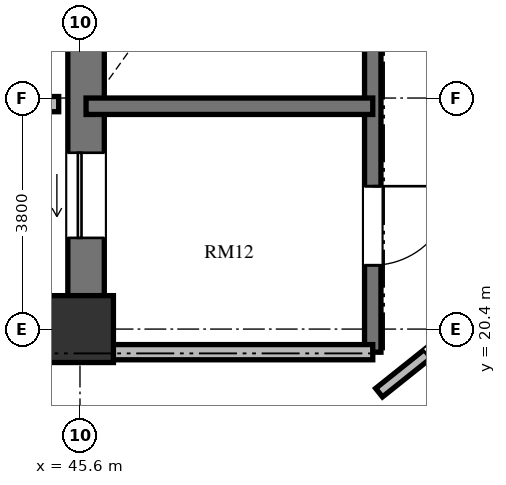
"""IFC4 building model, lengths in metres.
Left out: names, types, materials, properties, quantities, classifications, styles, units other than length and angle.
Written with IfcOpenShell. Run it as: python <this file> out.ifc"""

import sys

from ifc_helpers import new_model, si_unit, direction, frame, frame_2d, origin, origin_2d, place, context, subcontext, project, spatial, rectangle, extrude, element, fill, save


model = new_model("IFC4")
c1 = context("Model", 3, precision=1e-05, world=origin(), true_north=direction((0.0, 1.0)))
c2 = subcontext(c1, "Body", "Model", "MODEL_VIEW")
j1 = project(units=[si_unit("LENGTHUNIT", "METRE"), si_unit("PLANEANGLEUNIT", "RADIAN")], contexts=[c1])
p1 = place(None, origin())
s1 = spatial("IfcSite", under=j1, at=p1, CompositionType="ELEMENT")
p2 = place(p1, origin())
s2 = spatial("IfcBuilding", under=s1, at=p2, CompositionType="ELEMENT")
p3 = place(p2, frame((0.0, 0.0, 138.288)))
s3 = spatial("IfcBuildingStorey", under=s2, at=p3, CompositionType="ELEMENT", Elevation=138.288)
p4 = place(p3, frame((45.6, 20.4, 0.0), z_axis=(0.0, 0.0, 1.0), x_axis=(1.0, 0.0, 0.0)))
e1 = element("IfcColumn", 1, at=p4, inside=s3, PredefinedType="COLUMN", context=c2, shape_type="SweptSolid", body=[
    extrude(rectangle(XDim=1.1, YDim=1.1, at=origin_2d()), origin(), (0.0, 0.0, 1.0), 3.648),
])
p5 = place(p3, frame((45.7, 20.95, 0.0), z_axis=(0.0, 0.0, 1.0), x_axis=(0.0, 1.0, 0.0)))
e2 = element("IfcWall", 2, at=p5, inside=s3, PredefinedType="SHEAR", context=c2, shape_type="SweptSolid", body=[
    extrude(rectangle(XDim=14.1, YDim=0.6, at=frame_2d((7.05, 0.0))), origin(), (0.0, 0.0, 1.0), 3.648),
])
p6 = place(p5, frame((11.75, 0.0, 0.0)))
e3 = element("IfcOpeningElement", 3, at=p6, cuts=e2, PredefinedType="OPENING", context=c2, shape_type="SweptSolid", body=[
    extrude(rectangle(XDim=1.4, YDim=2.3, at=frame_2d((0.7, 1.15))), frame((0.0, 0.31, 0.0), z_axis=(0.0, -1.0, 0.0), x_axis=(1.0, 0.0, 0.0)), (0.0, 0.0, 1.0), 0.62),
])
p7 = place(p5, frame((0.95, 0.0, 0.0)))
e4 = element("IfcOpeningElement", 4, at=p7, cuts=e2, PredefinedType="OPENING", context=c2, shape_type="SweptSolid", body=[
    extrude(rectangle(XDim=1.4, YDim=2.3, at=frame_2d((0.7, 1.15))), frame((0.0, 0.31, 0.0), z_axis=(0.0, -1.0, 0.0), x_axis=(1.0, 0.0, 0.0)), (0.0, 0.0, 1.0), 0.62),
])
p8 = place(p3, frame((42.95, 24.1, 0.0), z_axis=(0.0, 0.0, 1.0), x_axis=(1.0, 0.0, 0.0)))
e5 = element("IfcWall", 5, at=p8, inside=s3, PredefinedType="SOLIDWALL", context=c2, shape_type="SweptSolid", body=[
    extrude(rectangle(XDim=2.3, YDim=0.25, at=frame_2d((1.15, 0.0))), origin(), (0.0, 0.0, 1.0), 3.428),
])
p9 = place(p3, frame((50.415, 35.845, 0.0), z_axis=(0.0, 0.0, 1.0), x_axis=(0.0, -1.0, 0.0)))
e6 = element("IfcWall", 6, at=p9, inside=s3, PredefinedType="SHEAR", context=c2, shape_type="SweptSolid", body=[
    extrude(rectangle(XDim=15.825, YDim=0.27, at=frame_2d((7.913, 0.0))), origin(), (0.0, 0.0, 1.0), 3.648),
])
p10 = place(p9, frame((4.445, 0.0, 0.0)))
e7 = element("IfcOpeningElement", 7, at=p10, cuts=e6, PredefinedType="OPENING", context=c2, shape_type="SweptSolid", body=[
    extrude(rectangle(XDim=1.2, YDim=2.15, at=frame_2d((0.6, 1.075))), frame((0.0, 0.145, 0.0), z_axis=(0.0, -1.0, 0.0), x_axis=(1.0, 0.0, 0.0)), (0.0, 0.0, 1.0), 0.29),
])
p11 = place(p9, frame((1.295, 0.0, 0.0)))
e8 = element("IfcOpeningElement", 8, at=p11, cuts=e6, PredefinedType="OPENING", context=c2, shape_type="SweptSolid", body=[
    extrude(rectangle(XDim=1.3, YDim=2.2, at=frame_2d((0.65, 1.1))), frame((0.0, 0.145, 0.0), z_axis=(0.0, -1.0, 0.0), x_axis=(1.0, 0.0, 0.0)), (0.0, 0.0, 1.0), 0.29),
])
p12 = place(p9, frame((13.095, 0.0, 0.0)))
e9 = element("IfcOpeningElement", 9, at=p12, cuts=e6, PredefinedType="OPENING", context=c2, shape_type="SweptSolid", body=[
    extrude(rectangle(XDim=1.3, YDim=2.2, at=frame_2d((0.65, 1.1))), frame((0.0, 0.145, 0.0), z_axis=(0.0, -1.0, 0.0), x_axis=(1.0, 0.0, 0.0)), (0.0, 0.0, 1.0), 0.29),
])
p13 = place(p3, frame((45.7, 24.065, 0.0), z_axis=(0.0, 0.0, 1.0), x_axis=(1.0, 0.0, 0.0)))
e10 = element("IfcWall", 10, at=p13, inside=s3, PredefinedType="SHEAR", context=c2, shape_type="SweptSolid", body=[
    extrude(rectangle(XDim=4.715, YDim=0.27, at=frame_2d((2.357, 0.0))), origin(), (0.0, 0.0, 1.0), 3.648),
])
p14 = place(p3, frame((45.7, 20.02, 0.0), z_axis=(0.0, 0.0, 1.0), x_axis=(1.0, 0.0, 0.0)))
e11 = element("IfcWall", 11, at=p14, inside=s3, PredefinedType="SOLIDWALL", context=c2, shape_type="SweptSolid", body=[
    extrude(rectangle(XDim=4.715, YDim=0.25, at=frame_2d((2.357, 0.0))), origin(), (0.0, 0.0, 1.0), 3.428),
])
p15 = place(p3, frame((53.181, 21.481, 0.0), z_axis=(0.0, 0.0, 1.0), x_axis=(-0.781420737726, -0.624004511724, 0.0)))
e12 = element("IfcWall", 12, at=p15, inside=s3, PredefinedType="PARTITIONING", context=c2, shape_type="SweptSolid", body=[
    extrude(rectangle(XDim=3.407, YDim=0.18, at=frame_2d((1.704, 0.0))), origin(), (0.0, 0.0, 1.0), 3.428),
])
p16 = place(p15, frame((1.004, 0.0, 0.0)))
e13 = element("IfcOpeningElement", 13, at=p16, cuts=e12, PredefinedType="OPENING", context=c2, shape_type="SweptSolid", body=[
    extrude(rectangle(XDim=1.4, YDim=2.2, at=frame_2d((0.7, 1.1))), frame((0.0, 0.1, 0.0), z_axis=(0.0, -1.0, 0.0), x_axis=(1.0, 0.0, 0.0)), (0.0, 0.0, 1.0), 0.2),
])
p17 = place(p7, origin())
e14 = element("IfcDoor", 14, at=p17, inside=s3, OperationType="SLIDING_TO_LEFT", PredefinedType="DOOR", context=c2, shape_type="SweptSolid", body=[
    extrude(rectangle(XDim=1.4, YDim=2.3, at=frame_2d((0.7, 1.15))), frame((0.0, 0.025, 0.0), z_axis=(0.0, -1.0, 0.0), x_axis=(1.0, 0.0, 0.0)), (0.0, 0.0, 1.0), 0.05),
])
fill(e4, e14)
p18 = place(p12, origin())
e15 = element("IfcDoor", 15, at=p18, inside=s3, OperationType="SINGLE_SWING_LEFT", PredefinedType="DOOR", context=c2, shape_type="SweptSolid", body=[
    extrude(rectangle(XDim=1.3, YDim=2.2, at=frame_2d((0.65, 1.1))), frame((0.0, 0.025, 0.0), z_axis=(0.0, -1.0, 0.0), x_axis=(1.0, 0.0, 0.0)), (0.0, 0.0, 1.0), 0.05),
])
fill(e9, e15)
p19 = place(p16, origin())
e16 = element("IfcDoor", 16, at=p19, inside=s3, OperationType="SINGLE_SWING_RIGHT", PredefinedType="DOOR", context=c2, shape_type="SweptSolid", body=[
    extrude(rectangle(XDim=1.4, YDim=2.2, at=frame_2d((0.7, 1.1))), frame((0.0, 0.025, 0.0), z_axis=(0.0, -1.0, 0.0), x_axis=(1.0, 0.0, 0.0)), (0.0, 0.0, 1.0), 0.05),
])
fill(e13, e16)
save(model, sys.argv[1])
